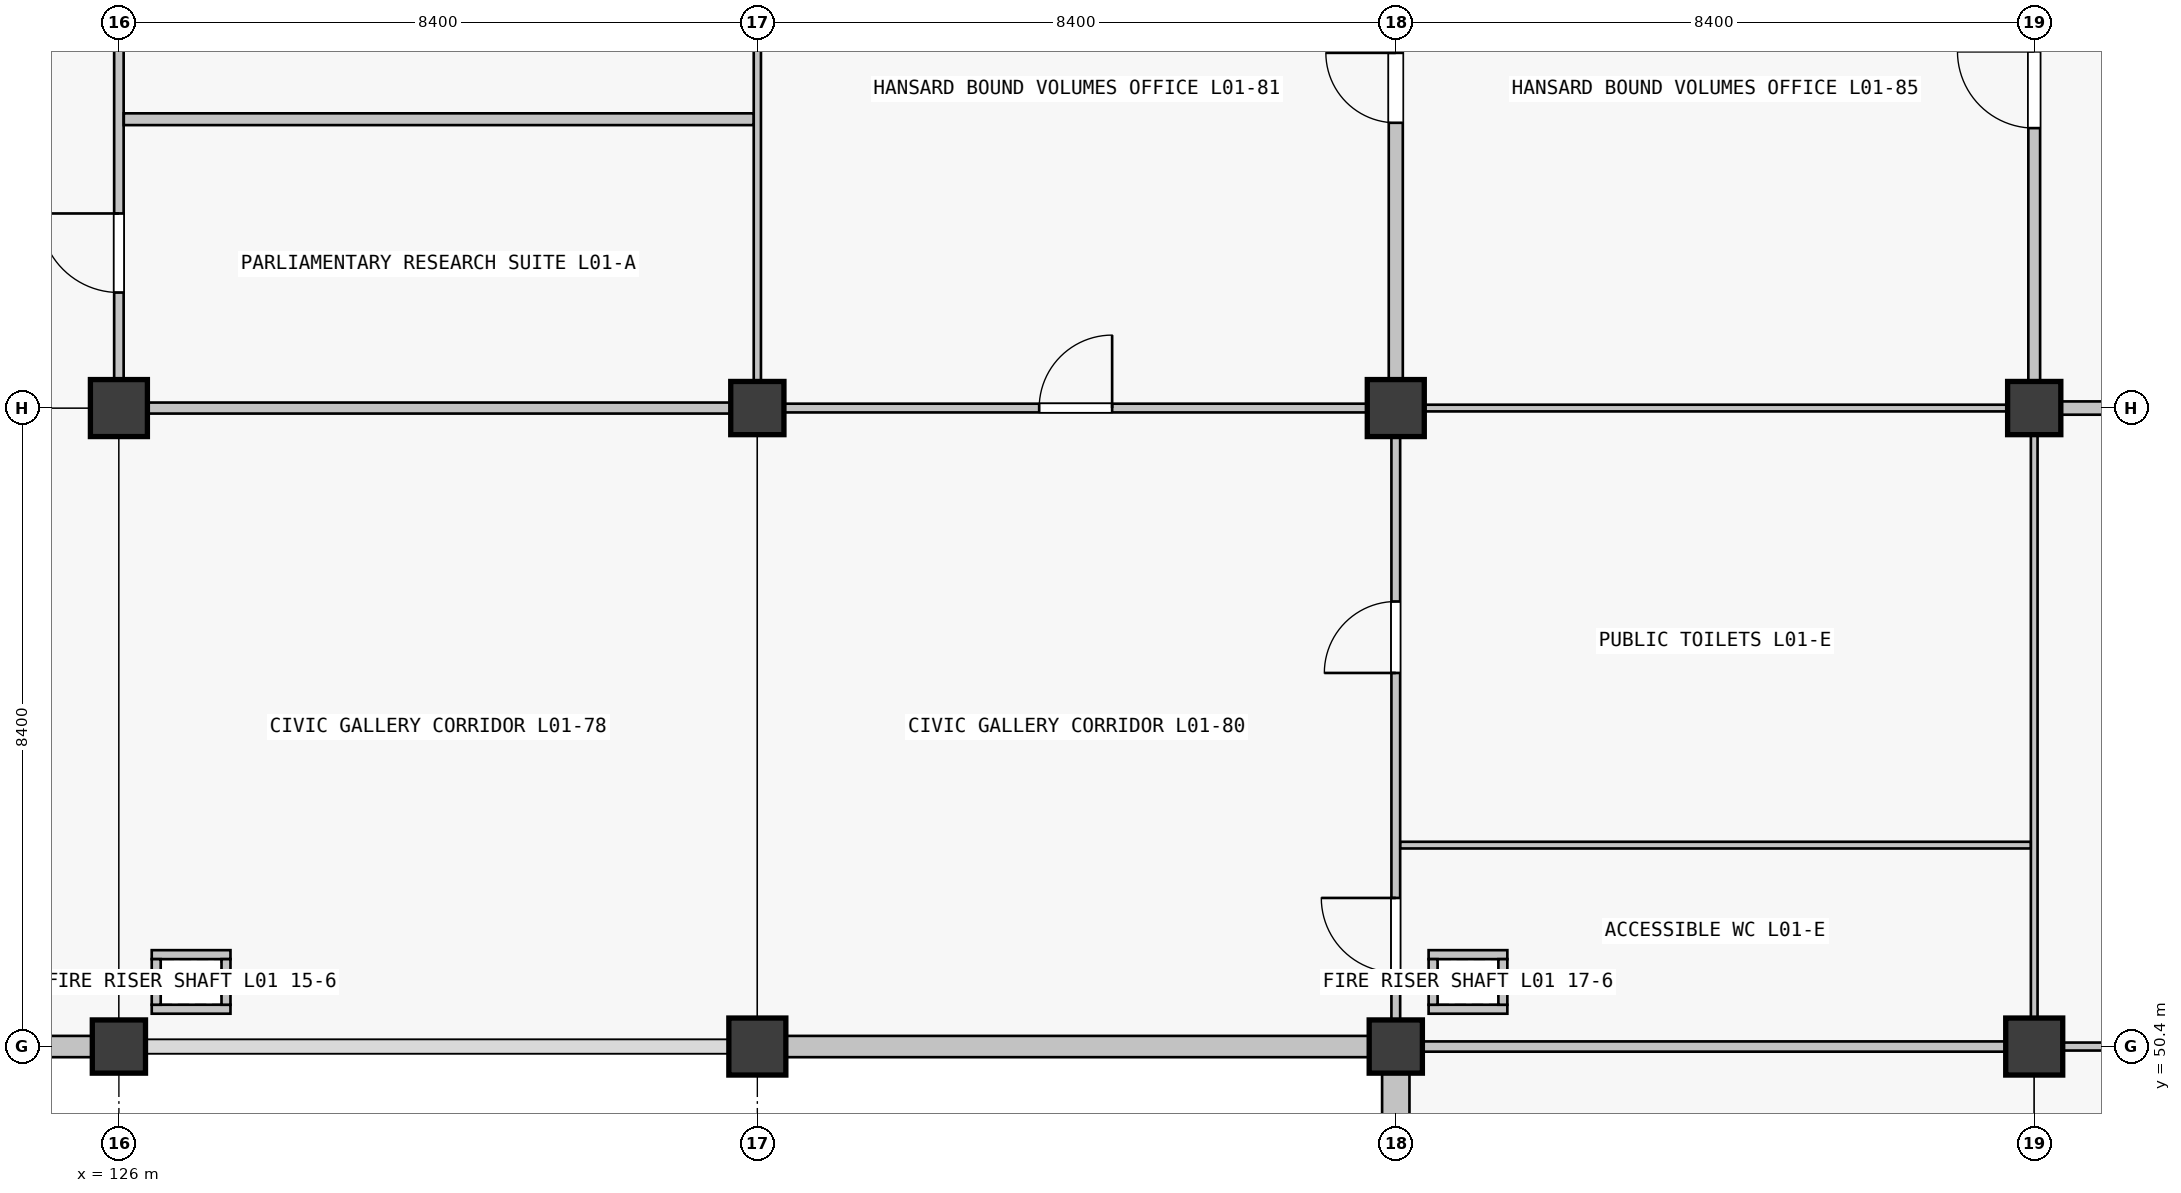
"""IFC4 building model, lengths in metres.
Left out: names, types, materials, properties, quantities, classifications, styles, units other than length and angle.
Written with IfcOpenShell. Run it as: python <this file> out.ifc"""

import sys

from ifc_helpers import new_model, si_unit, direction, frame, frame_2d, origin, origin_2d, place, context, subcontext, project, spatial, rectangle, extrude, element, fill, save


model = new_model("IFC4")
c1 = context("Model", 3, precision=1e-05, world=origin(), true_north=direction((0.0, 1.0)))
c2 = subcontext(c1, "Body", "Model", "MODEL_VIEW")
j1 = project(units=[si_unit("LENGTHUNIT", "METRE"), si_unit("PLANEANGLEUNIT", "RADIAN")], contexts=[c1])
p1 = place(None, origin())
s1 = spatial("IfcSite", under=j1, at=p1, CompositionType="ELEMENT")
p2 = place(p1, origin())
s2 = spatial("IfcBuilding", under=s1, at=p2, CompositionType="ELEMENT")
p3 = place(p2, frame((0.0, 0.0, 5.76)))
s3 = spatial("IfcBuildingStorey", under=s2, at=p3, CompositionType="ELEMENT", Elevation=5.76)
p4 = place(p3, frame((126.0, 50.4, 0.0), z_axis=(0.0, 0.0, 1.0), x_axis=(1.0, 0.0, 0.0)))
e1 = element("IfcColumn", 1, at=p4, inside=s3, PredefinedType="COLUMN", context=c2, shape_type="SweptSolid", body=[
    extrude(rectangle(XDim=0.7, YDim=0.7, at=origin_2d()), origin(), (0.0, 0.0, 1.0), 4.5),
])
for number, where, z_axis, x_axis in (
    (2, (126.0, 58.8, 0.0), (0.0, 0.0, 1.0), (1.0, 0.0, 0.0)),
    (3, (134.4, 50.4, 0.0), (0.0, 0.0, 1.0), (1.0, 0.0, 0.0)),
):
    element("IfcColumn", number, at=place(p3, frame(where, z_axis=z_axis, x_axis=x_axis)), inside=s3, PredefinedType="COLUMN", context=c2, shape_type="SweptSolid", body=[
        extrude(rectangle(XDim=0.75, YDim=0.75, at=origin_2d()), origin(), (0.0, 0.0, 1.0), 4.5),
    ])
for number, where, z_axis, x_axis in (
    (4, (134.4, 58.8, 0.0), (0.0, 0.0, 1.0), (1.0, 0.0, 0.0)),
    (5, (142.8, 50.4, 0.0), (0.0, 0.0, 1.0), (1.0, 0.0, 0.0)),
):
    element("IfcColumn", number, at=place(p3, frame(where, z_axis=z_axis, x_axis=x_axis)), inside=s3, PredefinedType="COLUMN", context=c2, shape_type="SweptSolid", body=[
        extrude(rectangle(XDim=0.7, YDim=0.7, at=origin_2d()), origin(), (0.0, 0.0, 1.0), 4.5),
    ])
for number, where, z_axis, x_axis in (
    (6, (142.8, 58.8, 0.0), (0.0, 0.0, 1.0), (1.0, 0.0, 0.0)),
    (7, (151.2, 50.4, 0.0), (0.0, 0.0, 1.0), (1.0, 0.0, 0.0)),
):
    element("IfcColumn", number, at=place(p3, frame(where, z_axis=z_axis, x_axis=x_axis)), inside=s3, PredefinedType="COLUMN", context=c2, shape_type="SweptSolid", body=[
        extrude(rectangle(XDim=0.75, YDim=0.75, at=origin_2d()), origin(), (0.0, 0.0, 1.0), 4.5),
    ])
p5 = place(p3, frame((151.2, 58.8, 0.0), z_axis=(0.0, 0.0, 1.0), x_axis=(1.0, 0.0, 0.0)))
e8 = element("IfcColumn", 8, at=p5, inside=s3, PredefinedType="COLUMN", context=c2, shape_type="SweptSolid", body=[
    extrude(rectangle(XDim=0.7, YDim=0.7, at=origin_2d()), origin(), (0.0, 0.0, 1.0), 4.5),
])
p6 = place(p3, frame((125.649, 50.4, 0.0), z_axis=(0.0, 0.0, 1.0), x_axis=(-1.0, 0.0, 0.0)))
e9 = element("IfcWall", 9, at=p6, inside=s3, PredefinedType="SOLIDWALL", context=c2, shape_type="SweptSolid", body=[
    extrude(rectangle(XDim=7.673, YDim=0.28, at=frame_2d((3.836, 0.0))), origin(), (0.0, 0.0, 1.0), 3.4),
])
p7 = place(p6, frame((2.236, 0.0, 0.9)))
e10 = element("IfcOpeningElement", 10, at=p7, cuts=e9, PredefinedType="OPENING", context=c2, shape_type="SweptSolid", body=[
    extrude(rectangle(XDim=3.2, YDim=1.75, at=frame_2d((1.6, 0.875))), frame((0.0, 0.14, 0.0), z_axis=(0.0, -1.0, 0.0), x_axis=(1.0, 0.0, 0.0)), (0.0, 0.0, 1.0), 0.28),
])
p8 = place(p3, frame((142.449, 50.4, 0.0), z_axis=(0.0, 0.0, 1.0), x_axis=(-1.0, 0.0, 0.0)))
e11 = element("IfcWall", 11, at=p8, inside=s3, PredefinedType="SOLIDWALL", context=c2, shape_type="SweptSolid", body=[
    extrude(rectangle(XDim=7.673, YDim=0.28, at=frame_2d((3.836, 0.0))), origin(), (0.0, 0.0, 1.0), 3.4),
])
p9 = place(p3, frame((142.8, 42.376, 0.0), z_axis=(0.0, 0.0, 1.0), x_axis=(0.0, 1.0, 0.0)))
e12 = element("IfcWall", 12, at=p9, inside=s3, PredefinedType="SOLIDWALL", context=c2, shape_type="SweptSolid", body=[
    extrude(rectangle(XDim=7.673, YDim=0.36, at=frame_2d((3.836, 0.0))), origin(), (0.0, 0.0, 1.0), 3.4),
])
p10 = place(p9, frame((3.386, 0.0, 0.9)))
e13 = element("IfcOpeningElement", 13, at=p10, cuts=e12, PredefinedType="OPENING", context=c2, shape_type="SweptSolid", body=[
    extrude(rectangle(XDim=0.9, YDim=1.5, at=frame_2d((0.45, 0.75))), frame((0.0, 0.18, 0.0), z_axis=(0.0, -1.0, 0.0), x_axis=(1.0, 0.0, 0.0)), (0.0, 0.0, 1.0), 0.36),
])
for number, where, z_axis, x_axis in (
    (14, (126.432, 50.891, 0.0), (0.0, 0.0, 1.0), (1.0, 0.0, 0.0)),
    (15, (126.432, 51.609, 0.0), (0.0, 0.0, 1.0), (1.0, 0.0, 0.0)),
):
    element("IfcWall", number, at=place(p3, frame(where, z_axis=z_axis, x_axis=x_axis)), inside=s3, PredefinedType="PARTITIONING", context=c2, shape_type="SweptSolid", body=[
        extrude(rectangle(XDim=1.036, YDim=0.118, at=frame_2d((0.518, 0.0))), origin(), (0.0, 0.0, 1.0), 3.48),
    ])
for number, where, z_axis, x_axis in (
    (16, (126.491, 50.95, 0.0), (0.0, 0.0, 1.0), (0.0, 1.0, 0.0)),
    (17, (127.409, 50.95, 0.0), (0.0, 0.0, 1.0), (0.0, 1.0, 0.0)),
):
    element("IfcWall", number, at=place(p3, frame(where, z_axis=z_axis, x_axis=x_axis)), inside=s3, PredefinedType="PARTITIONING", context=c2, shape_type="SweptSolid", body=[
        extrude(rectangle(XDim=0.6, YDim=0.118, at=frame_2d((0.3, 0.0))), origin(), (0.0, 0.0, 1.0), 3.48),
    ])
for number, where, z_axis, x_axis in (
    (18, (143.232, 50.891, 0.0), (0.0, 0.0, 1.0), (1.0, 0.0, 0.0)),
    (19, (143.232, 51.609, 0.0), (0.0, 0.0, 1.0), (1.0, 0.0, 0.0)),
):
    element("IfcWall", number, at=place(p3, frame(where, z_axis=z_axis, x_axis=x_axis)), inside=s3, PredefinedType="PARTITIONING", context=c2, shape_type="SweptSolid", body=[
        extrude(rectangle(XDim=1.036, YDim=0.118, at=frame_2d((0.518, 0.0))), origin(), (0.0, 0.0, 1.0), 3.48),
    ])
for number, where, z_axis, x_axis in (
    (20, (143.291, 50.95, 0.0), (0.0, 0.0, 1.0), (0.0, 1.0, 0.0)),
    (21, (144.209, 50.95, 0.0), (0.0, 0.0, 1.0), (0.0, 1.0, 0.0)),
):
    element("IfcWall", number, at=place(p3, frame(where, z_axis=z_axis, x_axis=x_axis)), inside=s3, PredefinedType="PARTITIONING", context=c2, shape_type="SweptSolid", body=[
        extrude(rectangle(XDim=0.6, YDim=0.118, at=frame_2d((0.3, 0.0))), origin(), (0.0, 0.0, 1.0), 3.48),
    ])
p11 = place(p3, frame((126.377, 58.8, 0.0), z_axis=(0.0, 0.0, 1.0), x_axis=(1.0, 0.0, 0.0)))
e22 = element("IfcWall", 22, at=p11, inside=s3, PredefinedType="PARTITIONING", context=c2, shape_type="SweptSolid", body=[
    extrude(rectangle(XDim=7.671, YDim=0.145, at=frame_2d((3.835, 0.0))), origin(), (0.0, 0.0, 1.0), 2.4),
])
p12 = place(p3, frame((134.752, 58.8, 0.0), z_axis=(0.0, 0.0, 1.0), x_axis=(1.0, 0.0, 0.0)))
e23 = element("IfcWall", 23, at=p12, inside=s3, PredefinedType="PARTITIONING", context=c2, shape_type="SweptSolid", body=[
    extrude(rectangle(XDim=7.671, YDim=0.115, at=frame_2d((3.835, 0.0))), origin(), (0.0, 0.0, 1.0), 2.4),
])
p13 = place(p12, frame((3.356, 0.0, 0.0)))
e24 = element("IfcOpeningElement", 24, at=p13, cuts=e23, PredefinedType="OPENING", context=c2, shape_type="SweptSolid", body=[
    extrude(rectangle(XDim=0.96, YDim=2.18, at=frame_2d((0.48, 1.09))), frame((0.0, 0.058, 0.0), z_axis=(0.0, -1.0, 0.0), x_axis=(1.0, 0.0, 0.0)), (0.0, 0.0, 1.0), 0.115),
])
p14 = place(p3, frame((143.152, 50.4, 0.0), z_axis=(0.0, 0.0, 1.0), x_axis=(1.0, 0.0, 0.0)))
e25 = element("IfcWall", 25, at=p14, inside=s3, PredefinedType="PARTITIONING", context=c2, shape_type="SweptSolid", body=[
    extrude(rectangle(XDim=7.671, YDim=0.135, at=frame_2d((3.835, 0.0))), origin(), (0.0, 0.0, 1.0), 2.4),
])
p15 = place(p3, frame((143.177, 58.8, 0.0), z_axis=(0.0, 0.0, 1.0), x_axis=(1.0, 0.0, 0.0)))
e26 = element("IfcWall", 26, at=p15, inside=s3, PredefinedType="PARTITIONING", context=c2, shape_type="SweptSolid", body=[
    extrude(rectangle(XDim=7.671, YDim=0.088, at=frame_2d((3.835, 0.0))), origin(), (0.0, 0.0, 1.0), 2.4),
])
p16 = place(p3, frame((151.577, 50.4, 0.0), z_axis=(0.0, 0.0, 1.0), x_axis=(1.0, 0.0, 0.0)))
e27 = element("IfcWall", 27, at=p16, inside=s3, PredefinedType="PARTITIONING", context=c2, shape_type="SweptSolid", body=[
    extrude(rectangle(XDim=7.671, YDim=0.105, at=frame_2d((3.835, 0.0))), origin(), (0.0, 0.0, 1.0), 2.4),
])
p17 = place(p16, frame((3.365, 0.0, 0.0)))
e28 = element("IfcOpeningElement", 28, at=p17, cuts=e27, PredefinedType="OPENING", context=c2, shape_type="SweptSolid", body=[
    extrude(rectangle(XDim=0.94, YDim=2.15, at=frame_2d((0.47, 1.075))), frame((0.0, 0.052, 0.0), z_axis=(0.0, -1.0, 0.0), x_axis=(1.0, 0.0, 0.0)), (0.0, 0.0, 1.0), 0.105),
])
p18 = place(p3, frame((151.552, 58.8, 0.0), z_axis=(0.0, 0.0, 1.0), x_axis=(1.0, 0.0, 0.0)))
e29 = element("IfcWall", 29, at=p18, inside=s3, PredefinedType="PARTITIONING", context=c2, shape_type="SweptSolid", body=[
    extrude(rectangle(XDim=7.671, YDim=0.175, at=frame_2d((3.835, 0.0))), origin(), (0.0, 0.0, 1.0), 2.4),
])
p19 = place(p18, frame((3.376, 0.0, 0.0)))
e30 = element("IfcOpeningElement", 30, at=p19, cuts=e29, PredefinedType="OPENING", context=c2, shape_type="SweptSolid", body=[
    extrude(rectangle(XDim=0.92, YDim=2.15, at=frame_2d((0.46, 1.075))), frame((0.0, 0.087, 0.0), z_axis=(0.0, -1.0, 0.0), x_axis=(1.0, 0.0, 0.0)), (0.0, 0.0, 1.0), 0.175),
])
p20 = place(p3, frame((126.0, 59.177, 0.0), z_axis=(0.0, 0.0, 1.0), x_axis=(0.0, 1.0, 0.0)))
e31 = element("IfcWall", 31, at=p20, inside=s3, PredefinedType="PARTITIONING", context=c2, shape_type="SweptSolid", body=[
    extrude(rectangle(XDim=7.721, YDim=0.125, at=frame_2d((3.86, 0.0))), origin(), (0.0, 0.0, 1.0), 2.4),
])
p21 = place(p20, frame((1.143, 0.0, 0.0)))
e32 = element("IfcOpeningElement", 32, at=p21, cuts=e31, PredefinedType="OPENING", context=c2, shape_type="SweptSolid", body=[
    extrude(rectangle(XDim=1.04, YDim=2.2, at=frame_2d((0.52, 1.1))), frame((0.0, 0.062, 0.0), z_axis=(0.0, -1.0, 0.0), x_axis=(1.0, 0.0, 0.0)), (0.0, 0.0, 1.0), 0.125),
])
p22 = place(p20, frame((5.073, 0.0, 0.0)))
e33 = element("IfcOpeningElement", 33, at=p22, cuts=e31, PredefinedType="OPENING", context=c2, shape_type="SweptSolid", body=[
    extrude(rectangle(XDim=1.02, YDim=2.2, at=frame_2d((0.51, 1.1))), frame((0.0, 0.062, 0.0), z_axis=(0.0, -1.0, 0.0), x_axis=(1.0, 0.0, 0.0)), (0.0, 0.0, 1.0), 0.125),
])
p23 = place(p3, frame((134.4, 59.152, 0.0), z_axis=(0.0, 0.0, 1.0), x_axis=(0.0, 1.0, 0.0)))
e34 = element("IfcWall", 34, at=p23, inside=s3, PredefinedType="PARTITIONING", context=c2, shape_type="SweptSolid", body=[
    extrude(rectangle(XDim=7.721, YDim=0.095, at=frame_2d((3.86, 0.0))), origin(), (0.0, 0.0, 1.0), 2.4),
])
p24 = place(p3, frame((142.8, 50.752, 0.0), z_axis=(0.0, 0.0, 1.0), x_axis=(0.0, 1.0, 0.0)))
e35 = element("IfcWall", 35, at=p24, inside=s3, PredefinedType="PARTITIONING", context=c2, shape_type="SweptSolid", body=[
    extrude(rectangle(XDim=7.671, YDim=0.115, at=frame_2d((3.835, 0.0))), origin(), (0.0, 0.0, 1.0), 2.4),
])
p25 = place(p24, frame((0.623, 0.0, 0.0)))
e36 = element("IfcOpeningElement", 36, at=p25, cuts=e35, PredefinedType="OPENING", context=c2, shape_type="SweptSolid", body=[
    extrude(rectangle(XDim=0.98, YDim=2.08, at=frame_2d((0.49, 1.04))), frame((0.0, 0.058, 0.0), z_axis=(0.0, -1.0, 0.0), x_axis=(1.0, 0.0, 0.0)), (0.0, 0.0, 1.0), 0.115),
])
p26 = place(p24, frame((4.563, 0.0, 0.0)))
e37 = element("IfcOpeningElement", 37, at=p26, cuts=e35, PredefinedType="OPENING", context=c2, shape_type="SweptSolid", body=[
    extrude(rectangle(XDim=0.94, YDim=2.08, at=frame_2d((0.47, 1.04))), frame((0.0, 0.058, 0.0), z_axis=(0.0, -1.0, 0.0), x_axis=(1.0, 0.0, 0.0)), (0.0, 0.0, 1.0), 0.115),
])
p27 = place(p3, frame((142.8, 59.177, 0.0), z_axis=(0.0, 0.0, 1.0), x_axis=(0.0, 1.0, 0.0)))
e38 = element("IfcWall", 38, at=p27, inside=s3, PredefinedType="PARTITIONING", context=c2, shape_type="SweptSolid", body=[
    extrude(rectangle(XDim=7.671, YDim=0.185, at=frame_2d((3.835, 0.0))), origin(), (0.0, 0.0, 1.0), 2.4),
])
p28 = place(p27, frame((3.376, 0.0, 0.0)))
e39 = element("IfcOpeningElement", 39, at=p28, cuts=e38, PredefinedType="OPENING", context=c2, shape_type="SweptSolid", body=[
    extrude(rectangle(XDim=0.92, YDim=2.15, at=frame_2d((0.46, 1.075))), frame((0.0, 0.093, 0.0), z_axis=(0.0, -1.0, 0.0), x_axis=(1.0, 0.0, 0.0)), (0.0, 0.0, 1.0), 0.185),
])
p29 = place(p3, frame((151.2, 50.777, 0.0), z_axis=(0.0, 0.0, 1.0), x_axis=(0.0, 1.0, 0.0)))
e40 = element("IfcWall", 40, at=p29, inside=s3, PredefinedType="PARTITIONING", context=c2, shape_type="SweptSolid", body=[
    extrude(rectangle(XDim=7.671, YDim=0.088, at=frame_2d((3.835, 0.0))), origin(), (0.0, 0.0, 1.0), 2.4),
])
p30 = place(p3, frame((151.2, 59.152, 0.0), z_axis=(0.0, 0.0, 1.0), x_axis=(0.0, 1.0, 0.0)))
e41 = element("IfcWall", 41, at=p30, inside=s3, PredefinedType="PARTITIONING", context=c2, shape_type="SweptSolid", body=[
    extrude(rectangle(XDim=7.671, YDim=0.155, at=frame_2d((3.835, 0.0))), origin(), (0.0, 0.0, 1.0), 2.4),
])
p31 = place(p30, frame((3.331, 0.0, 0.0)))
e42 = element("IfcOpeningElement", 42, at=p31, cuts=e41, PredefinedType="OPENING", context=c2, shape_type="SweptSolid", body=[
    extrude(rectangle(XDim=1.01, YDim=2.12, at=frame_2d((0.505, 1.06))), frame((0.0, 0.078, 0.0), z_axis=(0.0, -1.0, 0.0), x_axis=(1.0, 0.0, 0.0)), (0.0, 0.0, 1.0), 0.155),
])
p32 = place(p3, frame((126.064, 62.6, 0.0), z_axis=(0.0, 0.0, 1.0), x_axis=(1.0, 0.0, 0.0)))
e43 = element("IfcWall", 43, at=p32, inside=s3, PredefinedType="PARTITIONING", context=c2, shape_type="SweptSolid", body=[
    extrude(rectangle(XDim=8.286, YDim=0.155, at=frame_2d((4.143, 0.0))), origin(), (0.0, 0.0, 1.0), 2.4),
])
p33 = place(p3, frame((142.86, 53.05, 0.0), z_axis=(0.0, 0.0, 1.0), x_axis=(1.0, 0.0, 0.0)))
e44 = element("IfcWall", 44, at=p33, inside=s3, PredefinedType="PARTITIONING", context=c2, shape_type="SweptSolid", body=[
    extrude(rectangle(XDim=8.294, YDim=0.088, at=frame_2d((4.147, 0.0))), origin(), (0.0, 0.0, 1.0), 2.4),
])
p34 = place(p21, origin())
e45 = element("IfcDoor", 45, at=p34, inside=s3, OperationType="SINGLE_SWING_RIGHT", PredefinedType="DOOR", context=c2, shape_type="SweptSolid", body=[
    extrude(rectangle(XDim=1.04, YDim=2.2, at=frame_2d((0.52, 1.1))), frame((0.0, 0.025, 0.0), z_axis=(0.0, -1.0, 0.0), x_axis=(1.0, 0.0, 0.0)), (0.0, 0.0, 1.0), 0.05),
])
fill(e32, e45)
p35 = place(p25, origin())
e46 = element("IfcDoor", 46, at=p35, inside=s3, OperationType="SINGLE_SWING_RIGHT", PredefinedType="DOOR", context=c2, shape_type="SweptSolid", body=[
    extrude(rectangle(XDim=0.98, YDim=2.08, at=frame_2d((0.49, 1.04))), frame((0.0, 0.025, 0.0), z_axis=(0.0, -1.0, 0.0), x_axis=(1.0, 0.0, 0.0)), (0.0, 0.0, 1.0), 0.05),
])
fill(e36, e46)
p36 = place(p26, origin())
e47 = element("IfcDoor", 47, at=p36, inside=s3, OperationType="SINGLE_SWING_LEFT", PredefinedType="DOOR", context=c2, shape_type="SweptSolid", body=[
    extrude(rectangle(XDim=0.94, YDim=2.08, at=frame_2d((0.47, 1.04))), frame((0.0, 0.025, 0.0), z_axis=(0.0, -1.0, 0.0), x_axis=(1.0, 0.0, 0.0)), (0.0, 0.0, 1.0), 0.05),
])
fill(e37, e47)
p37 = place(p13, origin())
e48 = element("IfcDoor", 48, at=p37, inside=s3, OperationType="SINGLE_SWING_RIGHT", PredefinedType="DOOR", context=c2, shape_type="SweptSolid", body=[
    extrude(rectangle(XDim=0.96, YDim=2.18, at=frame_2d((0.48, 1.09))), frame((0.0, 0.025, 0.0), z_axis=(0.0, -1.0, 0.0), x_axis=(1.0, 0.0, 0.0)), (0.0, 0.0, 1.0), 0.05),
])
fill(e24, e48)
p38 = place(p28, origin())
e49 = element("IfcDoor", 49, at=p38, inside=s3, OperationType="SINGLE_SWING_RIGHT", PredefinedType="DOOR", context=c2, shape_type="SweptSolid", body=[
    extrude(rectangle(XDim=0.92, YDim=2.15, at=frame_2d((0.46, 1.075))), frame((0.0, 0.025, 0.0), z_axis=(0.0, -1.0, 0.0), x_axis=(1.0, 0.0, 0.0)), (0.0, 0.0, 1.0), 0.05),
])
fill(e39, e49)
p39 = place(p31, origin())
e50 = element("IfcDoor", 50, at=p39, inside=s3, OperationType="SINGLE_SWING_RIGHT", PredefinedType="DOOR", context=c2, shape_type="SweptSolid", body=[
    extrude(rectangle(XDim=1.01, YDim=2.12, at=frame_2d((0.505, 1.06))), frame((0.0, 0.025, 0.0), z_axis=(0.0, -1.0, 0.0), x_axis=(1.0, 0.0, 0.0)), (0.0, 0.0, 1.0), 0.05),
])
fill(e42, e50)
save(model, sys.argv[1])
